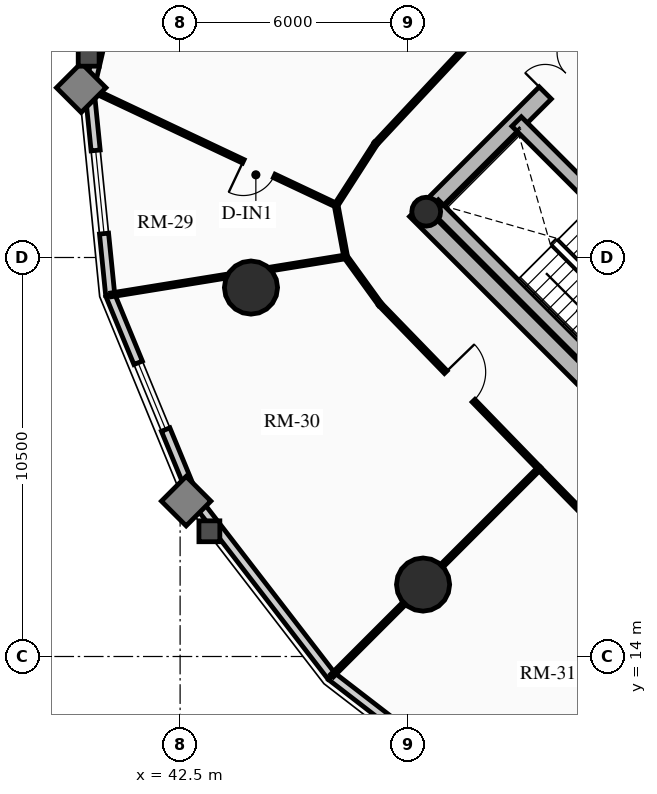
"""IFC4 building model, lengths in metres.
Left out: names, types, materials, properties, quantities, classifications, styles, units other than length and angle.
Written with IfcOpenShell. Run it as: python <this file> out.ifc"""

import sys

from ifc_helpers import new_model, si_unit, direction, frame, frame_2d, origin, origin_2d, place, context, subcontext, project, spatial, rectangle, circle, hollow_circle, extrude, source, transform, mapped, element, fill, save


model = new_model("IFC4")
c1 = context("Model", 3, precision=1e-05, world=origin(), true_north=direction((0.0, 1.0)))
c2 = subcontext(c1, "Body", "Model", "MODEL_VIEW")
j1 = project(units=[si_unit("LENGTHUNIT", "METRE"), si_unit("PLANEANGLEUNIT", "RADIAN")], contexts=[c1])
p1 = place(None, origin())
s1 = spatial("IfcSite", under=j1, at=p1, CompositionType="ELEMENT")
p2 = place(p1, origin())
s2 = spatial("IfcBuilding", under=s1, at=p2, CompositionType="ELEMENT")
p3 = place(p2, frame((0.0, 0.0, 102.16)))
s3 = spatial("IfcBuildingStorey", under=s2, at=p3, CompositionType="ELEMENT", Elevation=102.16)
p4 = place(p3, frame((58.737, 15.697, 0.0), z_axis=(0.0, 0.0, 1.0), x_axis=(-0.707106781187, 0.707106781187, 0.0)))
e1 = element("IfcWall", 1, at=p4, inside=s3, PredefinedType="SHEAR", context=c2, shape_type="SweptSolid", body=[
    extrude(rectangle(XDim=14.2, YDim=0.45, at=frame_2d((7.1, 0.0))), origin(), (0.0, 0.0, 1.0), 2.91),
])
p5 = place(p3, frame((48.856, 25.578, 0.0), z_axis=(0.0, 0.0, 1.0), x_axis=(0.707106781187, 0.707106781187, 0.0)))
e2 = element("IfcWall", 2, at=p5, inside=s3, PredefinedType="SHEAR", context=c2, shape_type="SweptSolid", body=[
    extrude(rectangle(XDim=10.7, YDim=0.45, at=frame_2d((5.35, 0.0))), origin(), (0.0, 0.0, 1.0), 2.91),
])
m1 = source(origin(), c2, "Body", "SweptSolid", [
    extrude(rectangle(XDim=1.5, YDim=2.02, at=frame_2d((0.75, 1.01))), frame((0.0, 0.235, 0.0), z_axis=(0.0, -1.0, 0.0), x_axis=(1.0, 0.0, 0.0)), (0.0, 0.0, 1.0), 0.47),
])
p6 = place(p5, frame((4.6, 0.0, 0.0)))
e3 = element("IfcOpeningElement", 3, at=p6, cuts=e2, PredefinedType="OPENING", context=c2, shape_type="MappedRepresentation", body=[
    mapped(m1, transform((0.0, 0.0, 0.0), x_axis=(1.0, 0.0, 0.0), y_axis=(0.0, 1.0, 0.0), z_axis=(0.0, 0.0, 1.0), scale=1.0)),
])
p7 = place(p3, frame((61.078, 18.355, 0.0), z_axis=(0.0, 0.0, 1.0), x_axis=(-0.707106781187, 0.707106781187, 0.0)))
e4 = element("IfcWall", 4, at=p7, inside=s3, PredefinedType="SHEAR", context=c2, shape_type="SweptSolid", body=[
    extrude(rectangle(XDim=13.75, YDim=0.35, at=frame_2d((6.875, 0.0))), origin(), (0.0, 0.0, 1.0), 2.91),
])
m2 = source(origin(), c2, "Body", "SweptSolid", [
    extrude(rectangle(XDim=1.1, YDim=2.015, at=frame_2d((0.55, 1.007))), frame((0.0, 0.185, 0.0), z_axis=(0.0, -1.0, 0.0), x_axis=(1.0, 0.0, 0.0)), (0.0, 0.0, 1.0), 0.37),
])
p8 = place(p7, frame((4.875, 0.0, 0.0)))
e5 = element("IfcOpeningElement", 5, at=p8, cuts=e4, PredefinedType="OPENING", context=c2, shape_type="MappedRepresentation", body=[
    mapped(m2, transform((0.0, 0.0, 0.0), x_axis=(1.0, 0.0, 0.0), y_axis=(0.0, 1.0, 0.0), z_axis=(0.0, 0.0, 1.0), scale=1.0)),
])
m3 = source(origin(), c2, "Body", "SweptSolid", [
    extrude(rectangle(XDim=1.15, YDim=2.02, at=frame_2d((0.575, 1.01))), frame((0.0, 0.185, 0.0), z_axis=(0.0, -1.0, 0.0), x_axis=(1.0, 0.0, 0.0)), (0.0, 0.0, 1.0), 0.37),
])
p9 = place(p7, frame((7.295, 0.0, 0.0)))
e6 = element("IfcOpeningElement", 6, at=p9, cuts=e4, PredefinedType="OPENING", context=c2, shape_type="MappedRepresentation", body=[
    mapped(m3, transform((0.0, 0.0, 0.0), x_axis=(1.0, 0.0, 0.0), y_axis=(0.0, 1.0, 0.0), z_axis=(0.0, 0.0, 1.0), scale=1.0)),
])
p10 = place(p3, frame((53.922, 21.141, 0.0), z_axis=(0.0, 0.0, 1.0), x_axis=(-0.707088616009, 0.707124945897, 0.0)))
e7 = element("IfcWall", 7, at=p10, inside=s3, PredefinedType="SHEAR", context=c2, shape_type="SweptSolid", body=[
    extrude(rectangle(XDim=6.72, YDim=0.35, at=frame_2d((3.36, 0.0))), origin(), (0.0, 0.0, 1.0), 2.91),
])
p11 = place(p3, frame((48.976, 25.706, 0.0), z_axis=(0.0, 0.0, 1.0), x_axis=(0.707106781187, 0.707106781187, 0.0)))
e8 = element("IfcColumn", 8, at=p11, inside=s3, PredefinedType="COLUMN", context=c2, shape_type="SweptSolid", body=[
    extrude(hollow_circle(Radius=0.38, WallThickness=0.032, at=origin_2d()), origin(), (0.0, 0.0, 1.0), 2.91),
])
for number, where, z_axis, x_axis in (
    (9, (44.365, 23.709, 0.0), (0.0, 0.0, 1.0), (1.0, 0.0, 0.0)),
    (10, (48.893, 15.893, 0.0), (0.0, 0.0, 1.0), (1.0, 0.0, 0.0)),
):
    element("IfcColumn", number, at=place(p3, frame(where, z_axis=z_axis, x_axis=x_axis)), inside=s3, PredefinedType="USERDEFINED", context=c2, shape_type="SweptSolid", body=[
        extrude(circle(Radius=0.7, at=origin_2d()), origin(), (0.0, 0.0, 1.0), 2.91),
    ])
p12 = place(p3, frame((40.115, 28.933, 0.0), z_axis=(0.0, 0.0, 1.0), x_axis=(0.225834725257, 0.974165631126, 0.0)))
e11 = element("IfcWall", 11, at=p12, inside=s3, PredefinedType="SOLIDWALL", context=c2, shape_type="SweptSolid", body=[
    extrude(rectangle(XDim=5.119, YDim=0.24, at=frame_2d((2.56, 0.0))), origin(), (0.0, 0.0, 1.0), 2.179),
])
p13 = place(p3, frame((40.661, 23.513, 0.0), z_axis=(0.0, 0.0, 1.0), x_axis=(-0.10015591906, 0.994971754311, 0.0)))
e12 = element("IfcWall", 12, at=p13, inside=s3, PredefinedType="SOLIDWALL", context=c2, shape_type="SweptSolid", body=[
    extrude(rectangle(XDim=5.448, YDim=0.24, at=frame_2d((2.724, 0.0))), origin(), (0.0, 0.0, 1.0), 2.179),
])
m4 = source(origin(), c2, "Body", "SweptSolid", [
    extrude(rectangle(XDim=2.2, YDim=1.35, at=frame_2d((1.1, 0.675))), frame((0.0, 0.13, 0.0), z_axis=(0.0, -1.0, 0.0), x_axis=(1.0, 0.0, 0.0)), (0.0, 0.0, 1.0), 0.26),
])
p14 = place(p13, frame((1.624, 0.0, 0.65)))
e13 = element("IfcOpeningElement", 13, at=p14, cuts=e12, PredefinedType="OPENING", context=c2, shape_type="MappedRepresentation", body=[
    mapped(m4, transform((0.0, 0.0, 0.0), x_axis=(1.0, 0.0, 0.0), y_axis=(0.0, 1.0, 0.0), z_axis=(0.0, 0.0, 1.0), scale=1.0)),
])
p15 = place(p3, frame((42.855, 18.189, 0.0), z_axis=(0.0, 0.0, 1.0), x_axis=(-0.381027003055, 0.924563909604, 0.0)))
e14 = element("IfcWall", 14, at=p15, inside=s3, PredefinedType="SOLIDWALL", context=c2, shape_type="SweptSolid", body=[
    extrude(rectangle(XDim=5.758, YDim=0.24, at=frame_2d((2.879, 0.0))), origin(), (0.0, 0.0, 1.0), 2.179),
])
m5 = source(origin(), c2, "Body", "SweptSolid", [
    extrude(rectangle(XDim=1.9, YDim=1.35, at=frame_2d((0.95, 0.675))), frame((0.0, 0.13, 0.0), z_axis=(0.0, -1.0, 0.0), x_axis=(1.0, 0.0, 0.0)), (0.0, 0.0, 1.0), 0.26),
])
p16 = place(p15, frame((1.929, 0.0, 0.65)))
e15 = element("IfcOpeningElement", 15, at=p16, cuts=e14, PredefinedType="OPENING", context=c2, shape_type="MappedRepresentation", body=[
    mapped(m5, transform((0.0, 0.0, 0.0), x_axis=(1.0, 0.0, 0.0), y_axis=(0.0, 1.0, 0.0), z_axis=(0.0, 0.0, 1.0), scale=1.0)),
])
p17 = place(p3, frame((46.483, 13.483, 0.0), z_axis=(0.0, 0.0, 1.0), x_axis=(-0.61054437102, 0.791982052206, 0.0)))
e16 = element("IfcWall", 16, at=p17, inside=s3, PredefinedType="SOLIDWALL", context=c2, shape_type="SweptSolid", body=[
    extrude(rectangle(XDim=5.942, YDim=0.24, at=frame_2d((2.971, 0.0))), origin(), (0.0, 0.0, 1.0), 2.179),
])
p18 = place(p3, frame((51.189, 9.855, 0.0), z_axis=(0.0, 0.0, 1.0), x_axis=(-0.791982052206, 0.61054437102, 0.0)))
e17 = element("IfcWall", 17, at=p18, inside=s3, PredefinedType="SOLIDWALL", context=c2, shape_type="SweptSolid", body=[
    extrude(rectangle(XDim=5.942, YDim=0.24, at=frame_2d((2.971, 0.0))), origin(), (0.0, 0.0, 1.0), 2.179),
])
p19 = place(p18, frame((1.871, 0.0, 0.65)))
e18 = element("IfcOpeningElement", 18, at=p19, cuts=e17, PredefinedType="OPENING", context=c2, shape_type="MappedRepresentation", body=[
    mapped(m4, transform((0.0, 0.0, 0.0), x_axis=(1.0, 0.0, 0.0), y_axis=(0.0, 1.0, 0.0), z_axis=(0.0, 0.0, 1.0), scale=1.0)),
])
p20 = place(p3, frame((52.072, 32.237, 0.0), z_axis=(0.0, 0.0, 1.0), x_axis=(-0.682528774423, -0.730858722383, 0.0)))
e19 = element("IfcWall", 19, at=p20, inside=s3, PredefinedType="MOVABLE", context=c2, shape_type="SweptSolid", body=[
    extrude(rectangle(XDim=6.486, YDim=0.1, at=frame_2d((3.243, 0.0))), origin(), (0.0, 0.0, 1.0), 2.225),
])
p21 = place(p3, frame((47.645, 27.497, 0.0), z_axis=(0.0, 0.0, 1.0), x_axis=(-0.540680612097, -0.841227957038, 0.0)))
e20 = element("IfcWall", 20, at=p21, inside=s3, PredefinedType="MOVABLE", context=c2, shape_type="SweptSolid", body=[
    extrude(rectangle(XDim=1.924, YDim=0.1, at=frame_2d((0.962, 0.0))), origin(), (0.0, 0.0, 1.0), 2.225),
])
p22 = place(p3, frame((46.605, 25.879, 0.0), z_axis=(0.0, 0.0, 1.0), x_axis=(0.182019785456, -0.983294868136, 0.0)))
e21 = element("IfcWall", 21, at=p22, inside=s3, PredefinedType="MOVABLE", context=c2, shape_type="SweptSolid", body=[
    extrude(rectangle(XDim=1.384, YDim=0.1, at=frame_2d((0.692, 0.0))), origin(), (0.0, 0.0, 1.0), 2.225),
])
p23 = place(p3, frame((46.857, 24.518, 0.0), z_axis=(0.0, 0.0, 1.0), x_axis=(0.58624548148, -0.810133467674, 0.0)))
e22 = element("IfcWall", 22, at=p23, inside=s3, PredefinedType="MOVABLE", context=c2, shape_type="SweptSolid", body=[
    extrude(rectangle(XDim=1.546, YDim=0.1, at=frame_2d((0.773, 0.0))), origin(), (0.0, 0.0, 1.0), 2.225),
])
p24 = place(p3, frame((47.763, 23.265, 0.0), z_axis=(0.0, 0.0, 1.0), x_axis=(0.696243493404, -0.717805682544, 0.0)))
e23 = element("IfcWall", 23, at=p24, inside=s3, PredefinedType="MOVABLE", context=c2, shape_type="SweptSolid", body=[
    extrude(rectangle(XDim=6.012, YDim=0.1, at=frame_2d((3.006, 0.0))), origin(), (0.0, 0.0, 1.0), 2.655),
])
m6 = source(origin(), c2, "Body", "SweptSolid", [
    extrude(rectangle(XDim=1.05, YDim=2.015, at=frame_2d((0.525, 1.007))), frame((0.0, 0.06, 0.0), z_axis=(0.0, -1.0, 0.0), x_axis=(1.0, 0.0, 0.0)), (0.0, 0.0, 1.0), 0.12),
])
p25 = place(p24, frame((2.481, 0.0, 0.0)))
e24 = element("IfcOpeningElement", 24, at=p25, cuts=e23, PredefinedType="OPENING", context=c2, shape_type="MappedRepresentation", body=[
    mapped(m6, transform((0.0, 0.0, 0.0), x_axis=(1.0, 0.0, 0.0), y_axis=(0.0, 1.0, 0.0), z_axis=(0.0, 0.0, 1.0), scale=1.0)),
])
p26 = place(p3, frame((51.949, 18.949, 0.0), z_axis=(0.0, 0.0, 1.0), x_axis=(0.699840807936, -0.714298847506, 0.0)))
e25 = element("IfcWall", 25, at=p26, inside=s3, PredefinedType="MOVABLE", context=c2, shape_type="SweptSolid", body=[
    extrude(rectangle(XDim=6.13, YDim=0.1, at=frame_2d((3.065, 0.0))), origin(), (0.0, 0.0, 1.0), 2.225),
])
p27 = place(p3, frame((46.857, 24.518, 0.0), z_axis=(0.0, 0.0, 1.0), x_axis=(-0.987101644997, -0.160094792056, 0.0)))
e26 = element("IfcWall", 26, at=p27, inside=s3, PredefinedType="MOVABLE", context=c2, shape_type="SweptSolid", body=[
    extrude(rectangle(XDim=6.257, YDim=0.1, at=frame_2d((3.128, 0.0))), origin(), (0.0, 0.0, 1.0), 2.179),
])
p28 = place(p3, frame((51.949, 18.949, 0.0), z_axis=(0.0, 0.0, 1.0), x_axis=(-0.707106781187, -0.707106781187, 0.0)))
e27 = element("IfcWall", 27, at=p28, inside=s3, PredefinedType="MOVABLE", context=c2, shape_type="SweptSolid", body=[
    extrude(rectangle(XDim=7.711, YDim=0.1, at=frame_2d((3.855, 0.0))), origin(), (0.0, 0.0, 1.0), 2.179),
])
p29 = place(p3, frame((46.605, 25.879, 0.0), z_axis=(0.0, 0.0, 1.0), x_axis=(-0.904450971726, 0.426577589359, 0.0)))
e28 = element("IfcWall", 28, at=p29, inside=s3, PredefinedType="MOVABLE", context=c2, shape_type="SweptSolid", body=[
    extrude(rectangle(XDim=7.154, YDim=0.1, at=frame_2d((3.577, 0.0))), origin(), (0.0, 0.0, 1.0), 2.179),
])
m7 = source(origin(), c2, "Body", "SweptSolid", [
    extrude(rectangle(XDim=0.9, YDim=2.005, at=frame_2d((0.45, 1.002))), frame((0.0, 0.06, 0.0), z_axis=(0.0, -1.0, 0.0), x_axis=(1.0, 0.0, 0.0)), (0.0, 0.0, 1.0), 0.12),
])
p30 = place(p29, frame((1.8, 0.0, 0.0)))
e29 = element("IfcOpeningElement", 29, at=p30, cuts=e28, PredefinedType="OPENING", context=c2, shape_type="MappedRepresentation", body=[
    mapped(m7, transform((0.0, 0.0, 0.0), x_axis=(1.0, 0.0, 0.0), y_axis=(0.0, 1.0, 0.0), z_axis=(0.0, 0.0, 1.0), scale=1.0)),
])
m8 = source(origin(), c2, "Body", "SweptSolid", [
    extrude(rectangle(XDim=2.2, YDim=1.35, at=frame_2d((1.1, 0.675))), frame((0.0, 0.03, 0.0), z_axis=(0.0, -1.0, 0.0), x_axis=(1.0, 0.0, 0.0)), (0.0, 0.0, 1.0), 0.06),
])
p31 = place(p14, origin())
e30 = element("IfcWindow", 30, at=p31, inside=s3, PartitioningType="DOUBLE_PANEL_VERTICAL", PredefinedType="WINDOW", context=c2, shape_type="MappedRepresentation", body=[
    mapped(m8, transform((0.0, 0.0, 0.0), x_axis=(1.0, 0.0, 0.0), y_axis=(0.0, 1.0, 0.0), z_axis=(0.0, 0.0, 1.0), scale=1.0)),
])
fill(e13, e30)
m9 = source(origin(), c2, "Body", "SweptSolid", [
    extrude(rectangle(XDim=1.9, YDim=1.35, at=frame_2d((0.95, 0.675))), frame((0.0, 0.03, 0.0), z_axis=(0.0, -1.0, 0.0), x_axis=(1.0, 0.0, 0.0)), (0.0, 0.0, 1.0), 0.06),
])
p32 = place(p16, origin())
e31 = element("IfcWindow", 31, at=p32, inside=s3, PartitioningType="DOUBLE_PANEL_VERTICAL", PredefinedType="WINDOW", context=c2, shape_type="MappedRepresentation", body=[
    mapped(m9, transform((0.0, 0.0, 0.0), x_axis=(1.0, 0.0, 0.0), y_axis=(0.0, 1.0, 0.0), z_axis=(0.0, 0.0, 1.0), scale=1.0)),
])
fill(e15, e31)
m10 = source(origin(), c2, "Body", "SweptSolid", [
    extrude(rectangle(XDim=1.5, YDim=2.02, at=frame_2d((0.75, 1.01))), frame((0.0, 0.025, 0.0), z_axis=(0.0, -1.0, 0.0), x_axis=(1.0, 0.0, 0.0)), (0.0, 0.0, 1.0), 0.05),
])
p33 = place(p6, origin())
e32 = element("IfcDoor", 32, at=p33, inside=s3, OperationType="DOUBLE_DOOR_SINGLE_SWING", PredefinedType="DOOR", context=c2, shape_type="MappedRepresentation", body=[
    mapped(m10, transform((0.0, 0.0, 0.0), x_axis=(1.0, 0.0, 0.0), y_axis=(0.0, 1.0, 0.0), z_axis=(0.0, 0.0, 1.0), scale=1.0)),
])
fill(e3, e32)
m11 = source(origin(), c2, "Body", "SweptSolid", [
    extrude(rectangle(XDim=0.9, YDim=2.005, at=frame_2d((0.45, 1.002))), frame((0.0, 0.025, 0.0), z_axis=(0.0, -1.0, 0.0), x_axis=(1.0, 0.0, 0.0)), (0.0, 0.0, 1.0), 0.05),
])
p34 = place(p30, origin())
e33 = element("IfcDoor", 33, at=p34, inside=s3, OperationType="SINGLE_SWING_RIGHT", PredefinedType="DOOR", context=c2, shape_type="MappedRepresentation", body=[
    mapped(m11, transform((0.0, 0.0, 0.0), x_axis=(1.0, 0.0, 0.0), y_axis=(0.0, 1.0, 0.0), z_axis=(0.0, 0.0, 1.0), scale=1.0)),
])
fill(e29, e33)
m12 = source(origin(), c2, "Body", "SweptSolid", [
    extrude(rectangle(XDim=1.05, YDim=2.015, at=frame_2d((0.525, 1.007))), frame((0.0, 0.025, 0.0), z_axis=(0.0, -1.0, 0.0), x_axis=(1.0, 0.0, 0.0)), (0.0, 0.0, 1.0), 0.05),
])
p35 = place(p25, origin())
e34 = element("IfcDoor", 34, at=p35, inside=s3, OperationType="SINGLE_SWING_LEFT", PredefinedType="DOOR", context=c2, shape_type="MappedRepresentation", body=[
    mapped(m12, transform((0.0, 0.0, 0.0), x_axis=(1.0, 0.0, 0.0), y_axis=(0.0, 1.0, 0.0), z_axis=(0.0, 0.0, 1.0), scale=1.0)),
])
fill(e24, e34)
save(model, sys.argv[1])
